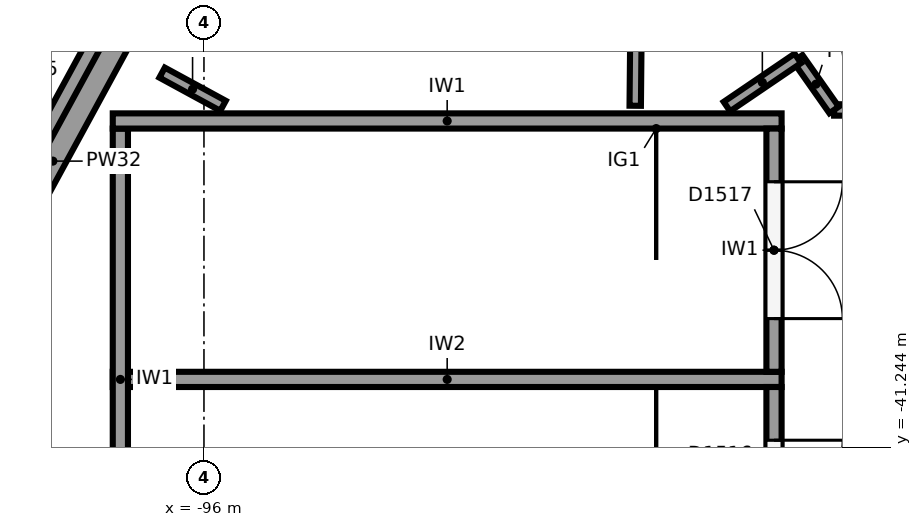
"""IFC4 building model, lengths in metres.
Left out: names, types, materials, properties, quantities, classifications, styles, units other than length and angle.
Written with IfcOpenShell. Run it as: python <this file> out.ifc"""

import sys

from ifc_helpers import new_model, si_unit, direction, frame, frame_2d, origin, place, context, subcontext, project, spatial, polyline, rectangle, outline, extrude, element, fill, save


model = new_model("IFC4")
c1 = context("Model", 3, precision=1e-05, world=origin(), true_north=direction((0.0, 1.0)))
c2 = subcontext(c1, "Body", "Model", "MODEL_VIEW")
j1 = project(units=[si_unit("LENGTHUNIT", "METRE"), si_unit("PLANEANGLEUNIT", "RADIAN")], contexts=[c1])
p1 = place(None, origin())
s1 = spatial("IfcSite", under=j1, at=p1, CompositionType="ELEMENT")
p2 = place(p1, origin())
s2 = spatial("IfcBuilding", under=s1, at=p2, CompositionType="ELEMENT")
p3 = place(p2, frame((0.0, 0.0, 24.0)))
s3 = spatial("IfcBuildingStorey", under=s2, at=p3, CompositionType="ELEMENT", Elevation=24.0)
p4 = place(p3, frame((-101.161, -43.311, 0.0), z_axis=(0.0, 0.0, 1.0), x_axis=(0.477867771117, 0.878431780691, 0.0)))
e1 = element("IfcWall", 1, at=p4, inside=s3, PredefinedType="SOLIDWALL", context=c2, shape_type="SweptSolid", body=[
    extrude(rectangle(XDim=13.28, YDim=0.32, at=frame_2d((6.64, 0.0))), origin(), (0.0, 0.0, 1.0), 6.0),
])
p5 = place(p4, frame((11.63, 0.0, 1.0)))
e2 = element("IfcOpeningElement", 2, at=p5, cuts=e1, PredefinedType="OPENING", context=c2, shape_type="SweptSolid", body=[
    extrude(rectangle(XDim=0.9, YDim=3.25, at=frame_2d((0.45, 1.625))), frame((0.0, 0.17, 0.0), z_axis=(0.0, -1.0, 0.0), x_axis=(1.0, 0.0, 0.0)), (0.0, 0.0, 1.0), 0.34),
])
p6 = place(p4, frame((9.53, 0.0, 1.0)))
e3 = element("IfcOpeningElement", 3, at=p6, cuts=e1, PredefinedType="OPENING", context=c2, shape_type="SweptSolid", body=[
    extrude(rectangle(XDim=0.9, YDim=3.25, at=frame_2d((0.45, 1.625))), frame((0.0, 0.17, 0.0), z_axis=(0.0, -1.0, 0.0), x_axis=(1.0, 0.0, 0.0)), (0.0, 0.0, 1.0), 0.34),
])
p7 = place(p4, frame((1.13, 0.0, 1.0)))
e4 = element("IfcOpeningElement", 4, at=p7, cuts=e1, PredefinedType="OPENING", context=c2, shape_type="SweptSolid", body=[
    extrude(rectangle(XDim=0.9, YDim=3.25, at=frame_2d((0.45, 1.625))), frame((0.0, 0.17, 0.0), z_axis=(0.0, -1.0, 0.0), x_axis=(1.0, 0.0, 0.0)), (0.0, 0.0, 1.0), 0.34),
])
p8 = place(p3, frame((-101.337, -43.215, 6.0), z_axis=(0.0, 0.0, 1.0), x_axis=(0.477867771117, 0.878431780691, 0.0)))
e5 = element("IfcWall", 5, at=p8, inside=s3, PredefinedType="SOLIDWALL", context=c2, shape_type="SweptSolid", body=[
    extrude(outline(polyline([(0.0, 0.0), (13.28, 0.0), (13.28, 4.105), (0.0, 10.451), (0.0, 0.0)])), frame((0.0, 0.16, 0.0), z_axis=(0.0, -1.0, 0.0), x_axis=(1.0, 0.0, 0.0)), (0.0, 0.0, 1.0), 0.32),
])
p9 = place(p8, frame((9.53, 0.0, 1.6)))
e6 = element("IfcOpeningElement", 6, at=p9, cuts=e5, PredefinedType="OPENING", context=c2, shape_type="SweptSolid", body=[
    extrude(rectangle(XDim=0.9, YDim=3.0, at=frame_2d((0.45, 1.5))), frame((0.0, 0.17, 0.0), z_axis=(0.0, -1.0, 0.0), x_axis=(1.0, 0.0, 0.0)), (0.0, 0.0, 1.0), 0.34),
])
p10 = place(p8, frame((1.13, 0.0, 1.6)))
e7 = element("IfcOpeningElement", 7, at=p10, cuts=e5, PredefinedType="OPENING", context=c2, shape_type="SweptSolid", body=[
    extrude(rectangle(XDim=0.9, YDim=3.0, at=frame_2d((0.45, 1.5))), frame((0.0, 0.17, 0.0), z_axis=(0.0, -1.0, 0.0), x_axis=(1.0, 0.0, 0.0)), (0.0, 0.0, 1.0), 0.34),
])
p11 = place(p3, frame((-97.2, -36.95, 0.0), z_axis=(0.0, 0.0, 1.0), x_axis=(1.0, 0.0, 0.0)))
e8 = element("IfcWall", 8, at=p11, inside=s3, PredefinedType="SHEAR", context=c2, shape_type="SweptSolid", body=[
    extrude(rectangle(XDim=8.8, YDim=0.2, at=frame_2d((4.4, 0.0))), origin(), (0.0, 0.0, 1.0), 5.75),
])
p12 = place(p3, frame((-97.1, -37.05, 0.0), z_axis=(0.0, 0.0, 1.0), x_axis=(0.0, -1.0, 0.0)))
e9 = element("IfcWall", 9, at=p12, inside=s3, PredefinedType="SHEAR", context=c2, shape_type="SweptSolid", body=[
    extrude(rectangle(XDim=6.6, YDim=0.2, at=frame_2d((3.3, 0.0))), origin(), (0.0, 0.0, 1.0), 5.75),
])
p13 = place(p3, frame((-97.2, -40.35, 0.0), z_axis=(0.0, 0.0, 1.0), x_axis=(1.0, 0.0, 0.0)))
e10 = element("IfcWall", 10, at=p13, inside=s3, PredefinedType="SHEAR", context=c2, shape_type="SweptSolid", body=[
    extrude(rectangle(XDim=8.8, YDim=0.2, at=frame_2d((4.4, 0.0))), origin(), (0.0, 0.0, 1.0), 5.75),
])
p14 = place(p3, frame((-88.5, -37.05, 0.0), z_axis=(0.0, 0.0, 1.0), x_axis=(0.0, -1.0, 0.0)))
e11 = element("IfcWall", 11, at=p14, inside=s3, PredefinedType="SHEAR", context=c2, shape_type="SweptSolid", body=[
    extrude(rectangle(XDim=3.2, YDim=0.2, at=frame_2d((1.6, 0.0))), origin(), (0.0, 0.0, 1.0), 5.75),
])
p15 = place(p14, frame((0.7, 0.0, 0.0)))
e12 = element("IfcOpeningElement", 12, at=p15, cuts=e11, PredefinedType="OPENING", context=c2, shape_type="SweptSolid", body=[
    extrude(rectangle(XDim=1.8, YDim=2.1, at=frame_2d((0.9, 1.05))), frame((0.0, 0.11, 0.0), z_axis=(0.0, -1.0, 0.0), x_axis=(1.0, 0.0, 0.0)), (0.0, 0.0, 1.0), 0.22),
])
p16 = place(p3, frame((-88.5, -40.45, 0.0), z_axis=(0.0, 0.0, 1.0), x_axis=(0.0, -1.0, 0.0)))
e13 = element("IfcWall", 13, at=p16, inside=s3, PredefinedType="SHEAR", context=c2, shape_type="SweptSolid", body=[
    extrude(rectangle(XDim=3.2, YDim=0.2, at=frame_2d((1.6, 0.0))), origin(), (0.0, 0.0, 1.0), 5.75),
])
p17 = place(p16, frame((0.7, 0.0, 0.0)))
e14 = element("IfcOpeningElement", 14, at=p17, cuts=e13, PredefinedType="OPENING", context=c2, shape_type="SweptSolid", body=[
    extrude(rectangle(XDim=1.8, YDim=2.1, at=frame_2d((0.9, 1.05))), frame((0.0, 0.11, 0.0), z_axis=(0.0, -1.0, 0.0), x_axis=(1.0, 0.0, 0.0)), (0.0, 0.0, 1.0), 0.22),
])
p18 = place(p3, frame((-95.749, -36.75, 0.0), z_axis=(0.0, 0.0, 1.0), x_axis=(-0.878487841863, 0.477764703279, 0.0)))
e15 = element("IfcWall", 15, at=p18, inside=s3, PredefinedType="PARTITIONING", context=c2, shape_type="SweptSolid", body=[
    extrude(rectangle(XDim=0.913, YDim=0.15, at=frame_2d((0.456, 0.0))), origin(), (0.0, 0.0, 1.0), 5.4),
])
p19 = place(p3, frame((-90.284, -32.404, 0.0), z_axis=(0.0, 0.0, 1.0), x_axis=(-0.009662470257, -0.999953317245, 0.0)))
e16 = element("IfcWall", 16, at=p19, inside=s3, PredefinedType="PARTITIONING", context=c2, shape_type="SweptSolid", body=[
    extrude(rectangle(XDim=4.346, YDim=0.15, at=frame_2d((2.173, 0.0))), origin(), (0.0, 0.0, 1.0), 5.4),
])
p20 = place(p19, frame((1.7, 0.0, 0.0)))
e17 = element("IfcOpeningElement", 17, at=p20, cuts=e16, PredefinedType="OPENING", context=c2, shape_type="SweptSolid", body=[
    extrude(rectangle(XDim=1.0, YDim=2.1, at=frame_2d((0.5, 1.05))), frame((0.0, 0.085, 0.0), z_axis=(0.0, -1.0, 0.0), x_axis=(1.0, 0.0, 0.0)), (0.0, 0.0, 1.0), 0.17),
])
p21 = place(p3, frame((-82.434, -36.805, 0.0), z_axis=(0.0, 0.0, 1.0), x_axis=(-1.0, 0.0, 0.0)))
e18 = element("IfcWall", 18, at=p21, inside=s3, PredefinedType="PARTITIONING", context=c2, shape_type="SweptSolid", body=[
    extrude(rectangle(XDim=5.276, YDim=0.15, at=frame_2d((2.638, 0.0))), origin(), (0.0, 0.0, 1.0), 5.4),
])
p22 = place(p21, frame((1.75, 0.0, 0.0)))
e19 = element("IfcOpeningElement", 19, at=p22, cuts=e18, PredefinedType="OPENING", context=c2, shape_type="SweptSolid", body=[
    extrude(rectangle(XDim=1.8, YDim=2.1, at=frame_2d((0.9, 1.05))), frame((0.0, 0.085, 0.0), z_axis=(0.0, -1.0, 0.0), x_axis=(1.0, 0.0, 0.0)), (0.0, 0.0, 1.0), 0.17),
])
p23 = place(p3, frame((-87.709, -36.805, 0.0), z_axis=(0.0, 0.0, 1.0), x_axis=(-0.575573582652, 0.81774999294, 0.0)))
e20 = element("IfcWall", 20, at=p23, inside=s3, PredefinedType="PARTITIONING", context=c2, shape_type="SweptSolid", body=[
    extrude(rectangle(XDim=0.83, YDim=0.15, at=frame_2d((0.415, 0.0))), origin(), (0.0, 0.0, 1.0), 5.4),
])
p24 = place(p3, frame((-88.187, -36.126, 0.0), z_axis=(0.0, 0.0, 1.0), x_axis=(-0.827055308354, -0.562120553728, 0.0)))
e21 = element("IfcWall", 21, at=p24, inside=s3, PredefinedType="PARTITIONING", context=c2, shape_type="SweptSolid", body=[
    extrude(rectangle(XDim=1.128, YDim=0.15, at=frame_2d((0.564, 0.0))), origin(), (0.0, 0.0, 1.0), 5.4),
])
p25 = place(p15, origin())
e22 = element("IfcDoor", 22, at=p25, inside=s3, OperationType="DOUBLE_DOOR_SINGLE_SWING", PredefinedType="DOOR", context=c2, shape_type="SweptSolid", body=[
    extrude(rectangle(XDim=1.8, YDim=2.1, at=frame_2d((0.9, 1.05))), frame((0.0, 0.025, 0.0), z_axis=(0.0, -1.0, 0.0), x_axis=(1.0, 0.0, 0.0)), (0.0, 0.0, 1.0), 0.05),
])
fill(e12, e22)
p26 = place(p17, origin())
e23 = element("IfcDoor", 23, at=p26, inside=s3, OperationType="DOUBLE_DOOR_SINGLE_SWING", PredefinedType="DOOR", context=c2, shape_type="SweptSolid", body=[
    extrude(rectangle(XDim=1.8, YDim=2.1, at=frame_2d((0.9, 1.05))), frame((0.0, 0.025, 0.0), z_axis=(0.0, -1.0, 0.0), x_axis=(1.0, 0.0, 0.0)), (0.0, 0.0, 1.0), 0.05),
])
fill(e14, e23)
save(model, sys.argv[1])
